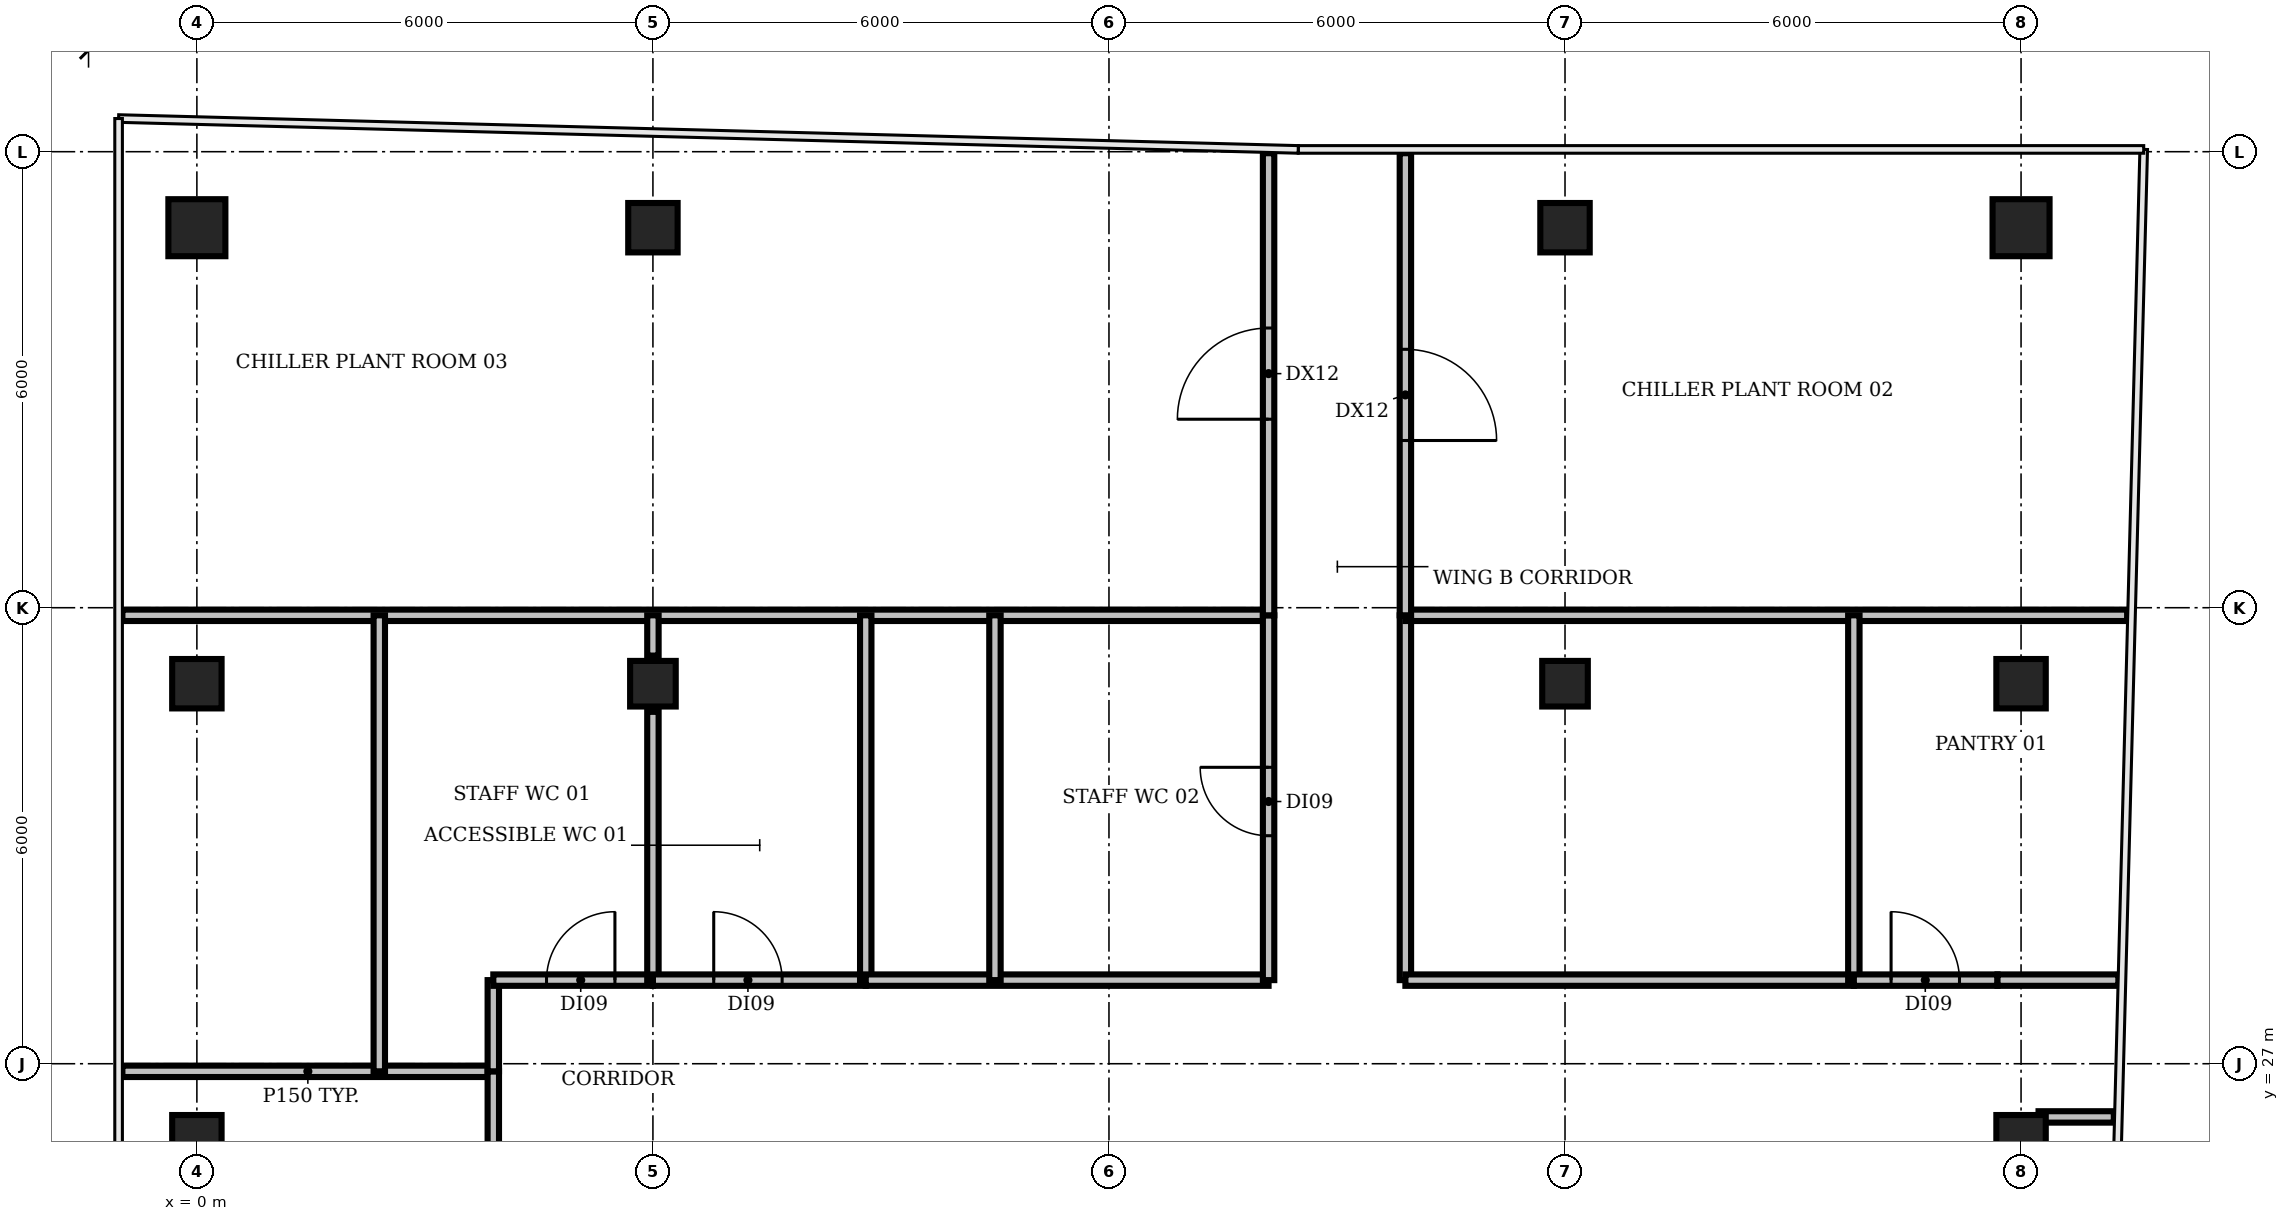
"""IFC4 building model, lengths in metres.
Left out: names, types, materials, properties, quantities, classifications, styles, units other than length and angle.
Written with IfcOpenShell. Run it as: python <this file> out.ifc"""

import sys

from ifc_helpers import new_model, si_unit, direction, frame, frame_2d, origin, origin_2d, place, context, subcontext, project, spatial, rectangle, circle, extrude, element, fill, save


model = new_model("IFC4")
c1 = context("Model", 3, precision=1e-05, world=origin(), true_north=direction((0.0, 1.0)))
c2 = subcontext(c1, "Body", "Model", "MODEL_VIEW")
j1 = project(units=[si_unit("LENGTHUNIT", "METRE"), si_unit("PLANEANGLEUNIT", "RADIAN")], contexts=[c1])
p1 = place(None, origin())
s1 = spatial("IfcSite", under=j1, at=p1, CompositionType="ELEMENT")
p2 = place(p1, origin())
s2 = spatial("IfcBuilding", under=s1, at=p2, CompositionType="ELEMENT")
p3 = place(p2, frame((0.0, 0.0, 339.8)))
s3 = spatial("IfcBuildingStorey", under=s2, at=p3, CompositionType="ELEMENT", Elevation=339.8)
for number, where, z_axis, x_axis in (
    (1, (0.0, 26.0, 0.0), (0.0, 0.0, 1.0), (1.0, 0.0, 0.0)),
    (2, (0.0, 32.0, 0.0), (0.0, 0.0, 1.0), (1.0, 0.0, 0.0)),
):
    element("IfcColumn", number, at=place(p3, frame(where, z_axis=z_axis, x_axis=x_axis)), inside=s3, PredefinedType="COLUMN", context=c2, shape_type="SweptSolid", body=[
        extrude(rectangle(XDim=0.65, YDim=0.65, at=origin_2d()), origin(), (0.0, 0.0, 1.0), 3.9),
    ])
p4 = place(p3, frame((0.0, 38.0, 0.0), z_axis=(0.0, 0.0, 1.0), x_axis=(1.0, 0.0, 0.0)))
e3 = element("IfcColumn", 3, at=p4, inside=s3, PredefinedType="COLUMN", context=c2, shape_type="SweptSolid", body=[
    extrude(circle(Radius=0.375, at=origin_2d()), origin(), (0.0, 0.0, 1.0), 3.9),
])
p5 = place(p3, frame((6.0, 32.0, 0.0), z_axis=(0.0, 0.0, 1.0), x_axis=(1.0, 0.0, 0.0)))
e4 = element("IfcColumn", 4, at=p5, inside=s3, PredefinedType="COLUMN", context=c2, shape_type="SweptSolid", body=[
    extrude(rectangle(XDim=0.6, YDim=0.6, at=origin_2d()), origin(), (0.0, 0.0, 1.0), 3.9),
])
p6 = place(p3, frame((6.0, 38.0, 0.0), z_axis=(0.0, 0.0, 1.0), x_axis=(1.0, 0.0, 0.0)))
e5 = element("IfcColumn", 5, at=p6, inside=s3, PredefinedType="COLUMN", context=c2, shape_type="SweptSolid", body=[
    extrude(rectangle(XDim=0.65, YDim=0.65, at=origin_2d()), origin(), (0.0, 0.0, 1.0), 3.9),
])
p7 = place(p3, frame((18.0, 32.0, 0.0), z_axis=(0.0, 0.0, 1.0), x_axis=(1.0, 0.0, 0.0)))
e6 = element("IfcColumn", 6, at=p7, inside=s3, PredefinedType="COLUMN", context=c2, shape_type="SweptSolid", body=[
    extrude(rectangle(XDim=0.6, YDim=0.6, at=origin_2d()), origin(), (0.0, 0.0, 1.0), 3.9),
])
for number, where, z_axis, x_axis in (
    (7, (18.0, 38.0, 0.0), (0.0, 0.0, 1.0), (1.0, 0.0, 0.0)),
    (8, (24.0, 26.0, 0.0), (0.0, 0.0, 1.0), (1.0, 0.0, 0.0)),
    (9, (24.0, 32.0, 0.0), (0.0, 0.0, 1.0), (1.0, 0.0, 0.0)),
):
    element("IfcColumn", number, at=place(p3, frame(where, z_axis=z_axis, x_axis=x_axis)), inside=s3, PredefinedType="COLUMN", context=c2, shape_type="SweptSolid", body=[
        extrude(rectangle(XDim=0.65, YDim=0.65, at=origin_2d()), origin(), (0.0, 0.0, 1.0), 3.9),
    ])
p8 = place(p3, frame((24.0, 38.0, 0.0), z_axis=(0.0, 0.0, 1.0), x_axis=(1.0, 0.0, 0.0)))
e10 = element("IfcColumn", 10, at=p8, inside=s3, PredefinedType="COLUMN", context=c2, shape_type="SweptSolid", body=[
    extrude(circle(Radius=0.375, at=origin_2d()), origin(), (0.0, 0.0, 1.0), 3.9),
])
p9 = place(p3, frame((-0.98, 26.9, 0.0), z_axis=(0.0, 0.0, 1.0), x_axis=(1.0, 0.0, 0.0)))
e11 = element("IfcWall", 11, at=p9, inside=s3, PredefinedType="PARTITIONING", context=c2, shape_type="SweptSolid", body=[
    extrude(rectangle(XDim=4.88, YDim=0.15, at=frame_2d((2.44, 0.0))), origin(), (0.0, 0.0, 1.0), 2.95),
])
p10 = place(p3, frame((-0.98, 32.9, 0.0), z_axis=(0.0, 0.0, 1.0), x_axis=(1.0, 0.0, 0.0)))
e12 = element("IfcWall", 12, at=p10, inside=s3, PredefinedType="PARTITIONING", context=c2, shape_type="SweptSolid", body=[
    extrude(rectangle(XDim=15.08, YDim=0.15, at=frame_2d((7.54, 0.0))), origin(), (0.0, 0.0, 1.0), 2.95),
])
p11 = place(p3, frame((2.4, 26.9, 0.0), z_axis=(0.0, 0.0, 1.0), x_axis=(0.0, 1.0, 0.0)))
e13 = element("IfcWall", 13, at=p11, inside=s3, PredefinedType="PARTITIONING", context=c2, shape_type="SweptSolid", body=[
    extrude(rectangle(XDim=6.0, YDim=0.15, at=frame_2d((3.0, 0.0))), origin(), (0.0, 0.0, 1.0), 2.95),
])
p12 = place(p3, frame((3.9, 22.5, 0.0), z_axis=(0.0, 0.0, 1.0), x_axis=(0.0, 1.0, 0.0)))
e14 = element("IfcWall", 14, at=p12, inside=s3, PredefinedType="PARTITIONING", context=c2, shape_type="SweptSolid", body=[
    extrude(rectangle(XDim=4.4, YDim=0.15, at=frame_2d((2.2, 0.0))), origin(), (0.0, 0.0, 1.0), 2.95),
])
p13 = place(p3, frame((3.9, 26.9, 0.0), z_axis=(0.0, 0.0, 1.0), x_axis=(0.0, 1.0, 0.0)))
e15 = element("IfcWall", 15, at=p13, inside=s3, PredefinedType="PARTITIONING", context=c2, shape_type="SweptSolid", body=[
    extrude(rectangle(XDim=1.2, YDim=0.15, at=frame_2d((0.6, 0.0))), origin(), (0.0, 0.0, 1.0), 2.95),
])
p14 = place(p3, frame((3.9, 28.1, 0.0), z_axis=(0.0, 0.0, 1.0), x_axis=(1.0, 0.0, 0.0)))
e16 = element("IfcWall", 16, at=p14, inside=s3, PredefinedType="PARTITIONING", context=c2, shape_type="SweptSolid", body=[
    extrude(rectangle(XDim=2.1, YDim=0.15, at=frame_2d((1.05, 0.0))), origin(), (0.0, 0.0, 1.0), 2.95),
])
p15 = place(p14, frame((0.7, 0.0, 0.0)))
e17 = element("IfcOpeningElement", 17, at=p15, cuts=e16, PredefinedType="OPENING", context=c2, shape_type="SweptSolid", body=[
    extrude(rectangle(XDim=0.9, YDim=2.1, at=frame_2d((0.45, 1.05))), frame((0.0, 0.085, 0.0), z_axis=(0.0, -1.0, 0.0), x_axis=(1.0, 0.0, 0.0)), (0.0, 0.0, 1.0), 0.17),
])
p16 = place(p3, frame((6.0, 28.1, 0.0), z_axis=(0.0, 0.0, 1.0), x_axis=(0.0, 1.0, 0.0)))
e18 = element("IfcWall", 18, at=p16, inside=s3, PredefinedType="PARTITIONING", context=c2, shape_type="SweptSolid", body=[
    extrude(rectangle(XDim=3.53, YDim=0.15, at=frame_2d((1.765, 0.0))), origin(), (0.0, 0.0, 1.0), 2.95),
])
p17 = place(p3, frame((6.0, 28.1, 0.0), z_axis=(0.0, 0.0, 1.0), x_axis=(1.0, 0.0, 0.0)))
e19 = element("IfcWall", 19, at=p17, inside=s3, PredefinedType="PARTITIONING", context=c2, shape_type="SweptSolid", body=[
    extrude(rectangle(XDim=2.8, YDim=0.15, at=frame_2d((1.4, 0.0))), origin(), (0.0, 0.0, 1.0), 2.95),
])
p18 = place(p17, frame((0.8, 0.0, 0.0)))
e20 = element("IfcOpeningElement", 20, at=p18, cuts=e19, PredefinedType="OPENING", context=c2, shape_type="SweptSolid", body=[
    extrude(rectangle(XDim=0.9, YDim=2.1, at=frame_2d((0.45, 1.05))), frame((0.0, 0.085, 0.0), z_axis=(0.0, -1.0, 0.0), x_axis=(1.0, 0.0, 0.0)), (0.0, 0.0, 1.0), 0.17),
])
p19 = place(p3, frame((6.0, 31.736, 0.0), z_axis=(0.0, 0.0, 1.0), x_axis=(0.0, 1.0, 0.0)))
e21 = element("IfcWall", 21, at=p19, inside=s3, PredefinedType="PARTITIONING", context=c2, shape_type="SweptSolid", body=[
    extrude(rectangle(XDim=0.529, YDim=0.15, at=frame_2d((0.264, 0.0))), origin(), (0.0, 0.0, 1.0), 2.95),
])
p20 = place(p3, frame((6.0, 32.37, 0.0), z_axis=(0.0, 0.0, 1.0), x_axis=(0.0, 1.0, 0.0)))
e22 = element("IfcWall", 22, at=p20, inside=s3, PredefinedType="PARTITIONING", context=c2, shape_type="SweptSolid", body=[
    extrude(rectangle(XDim=0.53, YDim=0.15, at=frame_2d((0.265, 0.0))), origin(), (0.0, 0.0, 1.0), 2.95),
])
p21 = place(p3, frame((8.8, 28.1, 0.0), z_axis=(0.0, 0.0, 1.0), x_axis=(0.0, 1.0, 0.0)))
e23 = element("IfcWall", 23, at=p21, inside=s3, PredefinedType="PARTITIONING", context=c2, shape_type="SweptSolid", body=[
    extrude(rectangle(XDim=4.8, YDim=0.15, at=frame_2d((2.4, 0.0))), origin(), (0.0, 0.0, 1.0), 2.95),
])
p22 = place(p3, frame((8.8, 28.1, 0.0), z_axis=(0.0, 0.0, 1.0), x_axis=(1.0, 0.0, 0.0)))
e24 = element("IfcWall", 24, at=p22, inside=s3, PredefinedType="PARTITIONING", context=c2, shape_type="SweptSolid", body=[
    extrude(rectangle(XDim=5.3, YDim=0.15, at=frame_2d((2.65, 0.0))), origin(), (0.0, 0.0, 1.0), 2.95),
])
p23 = place(p3, frame((10.5, 28.1, 0.0), z_axis=(0.0, 0.0, 1.0), x_axis=(0.0, 1.0, 0.0)))
e25 = element("IfcWall", 25, at=p23, inside=s3, PredefinedType="PARTITIONING", context=c2, shape_type="SweptSolid", body=[
    extrude(rectangle(XDim=4.8, YDim=0.15, at=frame_2d((2.4, 0.0))), origin(), (0.0, 0.0, 1.0), 2.95),
])
p24 = place(p3, frame((14.1, 28.1, 0.0), z_axis=(0.0, 0.0, 1.0), x_axis=(0.0, 1.0, 0.0)))
e26 = element("IfcWall", 26, at=p24, inside=s3, PredefinedType="PARTITIONING", context=c2, shape_type="SweptSolid", body=[
    extrude(rectangle(XDim=4.8, YDim=0.15, at=frame_2d((2.4, 0.0))), origin(), (0.0, 0.0, 1.0), 2.95),
])
p25 = place(p24, frame((1.9, 0.0, 0.0)))
e27 = element("IfcOpeningElement", 27, at=p25, cuts=e26, PredefinedType="OPENING", context=c2, shape_type="SweptSolid", body=[
    extrude(rectangle(XDim=0.9, YDim=2.1, at=frame_2d((0.45, 1.05))), frame((0.0, 0.085, 0.0), z_axis=(0.0, -1.0, 0.0), x_axis=(1.0, 0.0, 0.0)), (0.0, 0.0, 1.0), 0.17),
])
p26 = place(p3, frame((14.1, 32.9, 0.0), z_axis=(0.0, 0.0, 1.0), x_axis=(0.0, 1.0, 0.0)))
e28 = element("IfcWall", 28, at=p26, inside=s3, PredefinedType="PARTITIONING", context=c2, shape_type="SweptSolid", body=[
    extrude(rectangle(XDim=6.08, YDim=0.15, at=frame_2d((3.04, 0.0))), origin(), (0.0, 0.0, 1.0), 2.95),
])
p27 = place(p26, frame((2.58, 0.0, 0.0)))
e29 = element("IfcOpeningElement", 29, at=p27, cuts=e28, PredefinedType="OPENING", context=c2, shape_type="SweptSolid", body=[
    extrude(rectangle(XDim=1.2, YDim=2.1, at=frame_2d((0.6, 1.05))), frame((0.0, 0.085, 0.0), z_axis=(0.0, -1.0, 0.0), x_axis=(1.0, 0.0, 0.0)), (0.0, 0.0, 1.0), 0.17),
])
p28 = place(p3, frame((15.9, 28.1, 0.0), z_axis=(0.0, 0.0, 1.0), x_axis=(0.0, 1.0, 0.0)))
e30 = element("IfcWall", 30, at=p28, inside=s3, PredefinedType="PARTITIONING", context=c2, shape_type="SweptSolid", body=[
    extrude(rectangle(XDim=4.8, YDim=0.15, at=frame_2d((2.4, 0.0))), origin(), (0.0, 0.0, 1.0), 2.95),
])
p29 = place(p3, frame((15.9, 28.1, 0.0), z_axis=(0.0, 0.0, 1.0), x_axis=(1.0, 0.0, 0.0)))
e31 = element("IfcWall", 31, at=p29, inside=s3, PredefinedType="PARTITIONING", context=c2, shape_type="SweptSolid", body=[
    extrude(rectangle(XDim=5.9, YDim=0.15, at=frame_2d((2.95, 0.0))), origin(), (0.0, 0.0, 1.0), 2.95),
])
p30 = place(p3, frame((15.9, 32.9, 0.0), z_axis=(0.0, 0.0, 1.0), x_axis=(1.0, 0.0, 0.0)))
e32 = element("IfcWall", 32, at=p30, inside=s3, PredefinedType="PARTITIONING", context=c2, shape_type="SweptSolid", body=[
    extrude(rectangle(XDim=9.496, YDim=0.15, at=frame_2d((4.748, 0.0))), origin(), (0.0, 0.0, 1.0), 2.95),
])
p31 = place(p3, frame((15.9, 38.98, 0.0), z_axis=(0.0, 0.0, 1.0), x_axis=(0.0, -1.0, 0.0)))
e33 = element("IfcWall", 33, at=p31, inside=s3, PredefinedType="PARTITIONING", context=c2, shape_type="SweptSolid", body=[
    extrude(rectangle(XDim=6.08, YDim=0.15, at=frame_2d((3.04, 0.0))), origin(), (0.0, 0.0, 1.0), 2.95),
])
p32 = place(p31, frame((2.58, 0.0, 0.0)))
e34 = element("IfcOpeningElement", 34, at=p32, cuts=e33, PredefinedType="OPENING", context=c2, shape_type="SweptSolid", body=[
    extrude(rectangle(XDim=1.2, YDim=2.1, at=frame_2d((0.6, 1.05))), frame((0.0, 0.085, 0.0), z_axis=(0.0, -1.0, 0.0), x_axis=(1.0, 0.0, 0.0)), (0.0, 0.0, 1.0), 0.17),
])
p33 = place(p3, frame((21.8, 28.1, 0.0), z_axis=(0.0, 0.0, 1.0), x_axis=(0.0, 1.0, 0.0)))
e35 = element("IfcWall", 35, at=p33, inside=s3, PredefinedType="PARTITIONING", context=c2, shape_type="SweptSolid", body=[
    extrude(rectangle(XDim=4.8, YDim=0.15, at=frame_2d((2.4, 0.0))), origin(), (0.0, 0.0, 1.0), 2.95),
])
p34 = place(p3, frame((21.8, 28.1, 0.0), z_axis=(0.0, 0.0, 1.0), x_axis=(1.0, 0.0, 0.0)))
e36 = element("IfcWall", 36, at=p34, inside=s3, PredefinedType="PARTITIONING", context=c2, shape_type="SweptSolid", body=[
    extrude(rectangle(XDim=1.89, YDim=0.15, at=frame_2d((0.945, 0.0))), origin(), (0.0, 0.0, 1.0), 2.95),
])
p35 = place(p34, frame((0.49, 0.0, 0.0)))
e37 = element("IfcOpeningElement", 37, at=p35, cuts=e36, PredefinedType="OPENING", context=c2, shape_type="SweptSolid", body=[
    extrude(rectangle(XDim=0.9, YDim=2.1, at=frame_2d((0.45, 1.05))), frame((0.0, 0.085, 0.0), z_axis=(0.0, -1.0, 0.0), x_axis=(1.0, 0.0, 0.0)), (0.0, 0.0, 1.0), 0.17),
])
p36 = place(p3, frame((23.69, 28.1, 0.0), z_axis=(0.0, 0.0, 1.0), x_axis=(1.0, 0.0, 0.0)))
e38 = element("IfcWall", 38, at=p36, inside=s3, PredefinedType="PARTITIONING", context=c2, shape_type="SweptSolid", body=[
    extrude(rectangle(XDim=1.59, YDim=0.15, at=frame_2d((0.795, 0.0))), origin(), (0.0, 0.0, 1.0), 2.95),
])
p37 = place(p3, frame((24.23, 26.3, 0.0), z_axis=(0.0, 0.0, 1.0), x_axis=(1.0, 0.0, 0.0)))
e39 = element("IfcWall", 39, at=p37, inside=s3, PredefinedType="PARTITIONING", context=c2, shape_type="SweptSolid", body=[
    extrude(rectangle(XDim=0.99, YDim=0.15, at=frame_2d((0.495, 0.0))), origin(), (0.0, 0.0, 1.0), 2.95),
])
p38 = place(p15, origin())
e40 = element("IfcDoor", 40, at=p38, inside=s3, OperationType="SINGLE_SWING_RIGHT", PredefinedType="DOOR", context=c2, shape_type="SweptSolid", body=[
    extrude(rectangle(XDim=0.9, YDim=2.1, at=frame_2d((0.45, 1.05))), frame((0.0, 0.025, 0.0), z_axis=(0.0, -1.0, 0.0), x_axis=(1.0, 0.0, 0.0)), (0.0, 0.0, 1.0), 0.05),
])
fill(e17, e40)
p39 = place(p18, origin())
e41 = element("IfcDoor", 41, at=p39, inside=s3, OperationType="SINGLE_SWING_LEFT", PredefinedType="DOOR", context=c2, shape_type="SweptSolid", body=[
    extrude(rectangle(XDim=0.9, YDim=2.1, at=frame_2d((0.45, 1.05))), frame((0.0, 0.025, 0.0), z_axis=(0.0, -1.0, 0.0), x_axis=(1.0, 0.0, 0.0)), (0.0, 0.0, 1.0), 0.05),
])
fill(e20, e41)
p40 = place(p25, origin())
e42 = element("IfcDoor", 42, at=p40, inside=s3, OperationType="SINGLE_SWING_RIGHT", PredefinedType="DOOR", context=c2, shape_type="SweptSolid", body=[
    extrude(rectangle(XDim=0.9, YDim=2.1, at=frame_2d((0.45, 1.05))), frame((0.0, 0.025, 0.0), z_axis=(0.0, -1.0, 0.0), x_axis=(1.0, 0.0, 0.0)), (0.0, 0.0, 1.0), 0.05),
])
fill(e27, e42)
p41 = place(p27, origin())
e43 = element("IfcDoor", 43, at=p41, inside=s3, OperationType="SINGLE_SWING_LEFT", PredefinedType="DOOR", context=c2, shape_type="SweptSolid", body=[
    extrude(rectangle(XDim=1.2, YDim=2.1, at=frame_2d((0.6, 1.05))), frame((0.0, 0.025, 0.0), z_axis=(0.0, -1.0, 0.0), x_axis=(1.0, 0.0, 0.0)), (0.0, 0.0, 1.0), 0.05),
])
fill(e29, e43)
p42 = place(p32, origin())
e44 = element("IfcDoor", 44, at=p42, inside=s3, OperationType="SINGLE_SWING_RIGHT", PredefinedType="DOOR", context=c2, shape_type="SweptSolid", body=[
    extrude(rectangle(XDim=1.2, YDim=2.1, at=frame_2d((0.6, 1.05))), frame((0.0, 0.025, 0.0), z_axis=(0.0, -1.0, 0.0), x_axis=(1.0, 0.0, 0.0)), (0.0, 0.0, 1.0), 0.05),
])
fill(e34, e44)
p43 = place(p35, origin())
e45 = element("IfcDoor", 45, at=p43, inside=s3, OperationType="SINGLE_SWING_LEFT", PredefinedType="DOOR", context=c2, shape_type="SweptSolid", body=[
    extrude(rectangle(XDim=0.9, YDim=2.1, at=frame_2d((0.45, 1.05))), frame((0.0, 0.025, 0.0), z_axis=(0.0, -1.0, 0.0), x_axis=(1.0, 0.0, 0.0)), (0.0, 0.0, 1.0), 0.05),
])
fill(e37, e45)
save(model, sys.argv[1])
